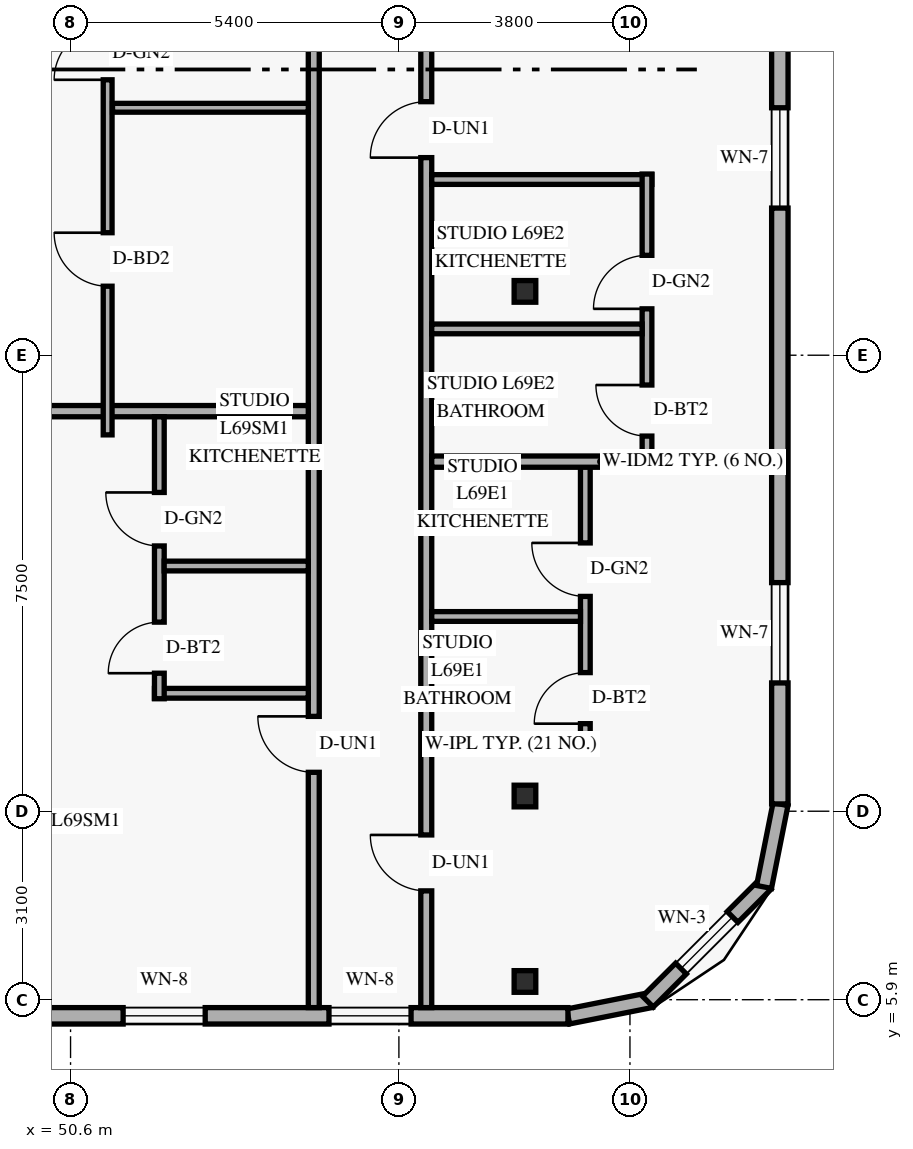
"""IFC4 building model, lengths in metres.
Left out: names, types, materials, properties, quantities, classifications, styles, units other than length and angle.
Written with IfcOpenShell. Run it as: python <this file> out.ifc"""

import sys

from ifc_helpers import new_model, si_unit, direction, frame, frame_2d, origin, origin_2d, place, context, subcontext, project, spatial, rectangle, hollow_rectangle, extrude, element, fill, save


model = new_model("IFC4")
c1 = context("Model", 3, precision=1e-05, world=origin(), true_north=direction((0.0, 1.0)))
c2 = subcontext(c1, "Body", "Model", "MODEL_VIEW")
j1 = project(units=[si_unit("LENGTHUNIT", "METRE"), si_unit("PLANEANGLEUNIT", "RADIAN")], contexts=[c1])
p1 = place(None, origin())
s1 = spatial("IfcSite", under=j1, at=p1, CompositionType="ELEMENT")
p2 = place(p1, origin())
s2 = spatial("IfcBuilding", under=s1, at=p2, CompositionType="ELEMENT")
p3 = place(p2, frame((0.0, 0.0, 264.0)))
s3 = spatial("IfcBuildingStorey", under=s2, at=p3, CompositionType="ELEMENT", Elevation=264.0)
for number, where, z_axis, x_axis in (
    (1, (57.969, 6.2, 0.0), (0.058, 0.0, 0.998), (0.0, 1.0, 0.0)),
    (2, (57.969, 9.25, 0.0), (0.058, 0.0, 0.998), (0.0, 1.0, 0.0)),
    (3, (57.969, 17.55, 0.0), (0.058, 0.0, 0.998), (0.0, 1.0, 0.0)),
):
    element("IfcColumn", number, at=place(p3, frame(where, z_axis=z_axis, x_axis=x_axis)), inside=s3, PredefinedType="COLUMN", context=c2, shape_type="SweptSolid", body=[
        extrude(hollow_rectangle(XDim=0.356, YDim=0.356, WallThickness=0.016, at=origin_2d()), origin(), (0.0, 0.0, 1.0), 3.606),
    ])
p4 = place(p3, frame((58.783, 5.624, 0.0), z_axis=(0.0, 0.0, 1.0), x_axis=(0.980809899341, 0.19496651342, 0.0)))
e4 = element("IfcWall", 4, at=p4, inside=s3, PredefinedType="SOLIDWALL", context=c2, shape_type="SweptSolid", body=[
    extrude(rectangle(XDim=1.389, YDim=0.25, at=frame_2d((0.694, 0.0))), origin(), (0.0, 0.0, 1.0), 3.36),
])
p5 = place(p3, frame((60.095, 5.868, 0.0), z_axis=(0.0, 0.0, 1.0), x_axis=(0.707106781187, 0.707106781187, 0.0)))
e5 = element("IfcWall", 5, at=p5, inside=s3, PredefinedType="SOLIDWALL", context=c2, shape_type="SweptSolid", body=[
    extrude(rectangle(XDim=2.739, YDim=0.25, at=frame_2d((1.37, 0.0))), origin(), (0.0, 0.0, 1.0), 3.36),
])
p6 = place(p5, frame((0.77, 0.0, 0.85)))
e6 = element("IfcOpeningElement", 6, at=p6, cuts=e5, PredefinedType="OPENING", context=c2, shape_type="SweptSolid", body=[
    extrude(rectangle(XDim=1.2, YDim=1.5, at=frame_2d((0.6, 0.75))), frame((0.0, 0.135, 0.0), z_axis=(0.0, -1.0, 0.0), x_axis=(1.0, 0.0, 0.0)), (0.0, 0.0, 1.0), 0.27),
])
p7 = place(p3, frame((62.005, 7.754, 0.0), z_axis=(0.0, 0.0, 1.0), x_axis=(0.195135625965, 0.9807762678, 0.0)))
e7 = element("IfcWall", 7, at=p7, inside=s3, PredefinedType="SOLIDWALL", context=c2, shape_type="SweptSolid", body=[
    extrude(rectangle(XDim=1.389, YDim=0.25, at=frame_2d((0.694, 0.0))), origin(), (0.0, 0.0, 1.0), 3.36),
])
p8 = place(p3, frame((25.82, 5.635, 0.0), z_axis=(0.0, 0.0, 1.0), x_axis=(1.0, 0.0, 0.0)))
e8 = element("IfcWall", 8, at=p8, inside=s3, PredefinedType="SOLIDWALL", context=c2, shape_type="SweptSolid", body=[
    extrude(rectangle(XDim=32.96, YDim=0.27, at=frame_2d((16.48, 0.0))), origin(), (0.0, 0.0, 1.0), 3.36),
])
p9 = place(p8, frame((14.363, 0.0, 0.85)))
e9 = element("IfcOpeningElement", 9, at=p9, cuts=e8, PredefinedType="OPENING", context=c2, shape_type="SweptSolid", body=[
    extrude(rectangle(XDim=1.35, YDim=1.55, at=frame_2d((0.675, 0.775))), frame((0.0, 0.145, 0.0), z_axis=(0.0, -1.0, 0.0), x_axis=(1.0, 0.0, 0.0)), (0.0, 0.0, 1.0), 0.29),
])
p10 = place(p8, frame((25.645, 0.0, 0.85)))
e10 = element("IfcOpeningElement", 10, at=p10, cuts=e8, PredefinedType="OPENING", context=c2, shape_type="SweptSolid", body=[
    extrude(rectangle(XDim=1.35, YDim=1.55, at=frame_2d((0.675, 0.775))), frame((0.0, 0.145, 0.0), z_axis=(0.0, -1.0, 0.0), x_axis=(1.0, 0.0, 0.0)), (0.0, 0.0, 1.0), 0.29),
])
p11 = place(p8, frame((29.03, 0.0, 0.85)))
e11 = element("IfcOpeningElement", 11, at=p11, cuts=e8, PredefinedType="OPENING", context=c2, shape_type="SweptSolid", body=[
    extrude(rectangle(XDim=1.35, YDim=1.55, at=frame_2d((0.675, 0.775))), frame((0.0, 0.145, 0.0), z_axis=(0.0, -1.0, 0.0), x_axis=(1.0, 0.0, 0.0)), (0.0, 0.0, 1.0), 0.29),
])
p12 = place(p3, frame((62.265, 9.12, 0.0), z_axis=(0.0, 0.0, 1.0), x_axis=(0.0, 1.0, 0.0)))
e12 = element("IfcWall", 12, at=p12, inside=s3, PredefinedType="SOLIDWALL", context=c2, shape_type="SweptSolid", body=[
    extrude(rectangle(XDim=29.76, YDim=0.27, at=frame_2d((14.88, 0.0))), origin(), (0.0, 0.0, 1.0), 3.36),
])
p13 = place(p12, frame((1.99, 0.0, 0.85)))
e13 = element("IfcOpeningElement", 13, at=p13, cuts=e12, PredefinedType="OPENING", context=c2, shape_type="SweptSolid", body=[
    extrude(rectangle(XDim=1.65, YDim=1.6, at=frame_2d((0.825, 0.8))), frame((0.0, 0.145, 0.0), z_axis=(0.0, -1.0, 0.0), x_axis=(1.0, 0.0, 0.0)), (0.0, 0.0, 1.0), 0.29),
])
p14 = place(p12, frame((9.8, 0.0, 0.85)))
e14 = element("IfcOpeningElement", 14, at=p14, cuts=e12, PredefinedType="OPENING", context=c2, shape_type="SweptSolid", body=[
    extrude(rectangle(XDim=1.65, YDim=1.6, at=frame_2d((0.825, 0.8))), frame((0.0, 0.145, 0.0), z_axis=(0.0, -1.0, 0.0), x_axis=(1.0, 0.0, 0.0)), (0.0, 0.0, 1.0), 0.29),
])
p15 = place(p12, frame((19.42, 0.0, 0.85)))
e15 = element("IfcOpeningElement", 15, at=p15, cuts=e12, PredefinedType="OPENING", context=c2, shape_type="SweptSolid", body=[
    extrude(rectangle(XDim=1.65, YDim=1.6, at=frame_2d((0.825, 0.8))), frame((0.0, 0.145, 0.0), z_axis=(0.0, -1.0, 0.0), x_axis=(1.0, 0.0, 0.0)), (0.0, 0.0, 1.0), 0.29),
])
p16 = place(p12, frame((26.49, 0.0, 0.85)))
e16 = element("IfcOpeningElement", 16, at=p16, cuts=e12, PredefinedType="OPENING", context=c2, shape_type="SweptSolid", body=[
    extrude(rectangle(XDim=1.65, YDim=1.6, at=frame_2d((0.825, 0.8))), frame((0.0, 0.145, 0.0), z_axis=(0.0, -1.0, 0.0), x_axis=(1.0, 0.0, 0.0)), (0.0, 0.0, 1.0), 0.29),
])
p17 = place(p3, frame((54.6, 5.77, 0.0), z_axis=(0.0, 0.0, 1.0), x_axis=(0.0, 1.0, 0.0)))
e17 = element("IfcWall", 17, at=p17, inside=s3, PredefinedType="STANDARD", context=c2, shape_type="SweptSolid", body=[
    extrude(rectangle(XDim=19.23, YDim=0.18, at=frame_2d((9.615, 0.0))), origin(), (0.0, 0.0, 1.0), 2.803),
])
p18 = place(p17, frame((3.87, 0.0, 0.0)))
e18 = element("IfcOpeningElement", 18, at=p18, cuts=e17, PredefinedType="OPENING", context=c2, shape_type="SweptSolid", body=[
    extrude(rectangle(XDim=0.92, YDim=2.15, at=frame_2d((0.46, 1.075))), frame((0.0, 0.1, 0.0), z_axis=(0.0, -1.0, 0.0), x_axis=(1.0, 0.0, 0.0)), (0.0, 0.0, 1.0), 0.2),
])
p19 = place(p3, frame((56.45, 5.77, 0.0), z_axis=(0.0, 0.0, 1.0), x_axis=(0.0, 1.0, 0.0)))
e19 = element("IfcWall", 19, at=p19, inside=s3, PredefinedType="STANDARD", context=c2, shape_type="SweptSolid", body=[
    extrude(rectangle(XDim=36.46, YDim=0.18, at=frame_2d((18.23, 0.0))), origin(), (0.0, 0.0, 1.0), 2.803),
])
p20 = place(p19, frame((1.92, 0.0, 0.0)))
e20 = element("IfcOpeningElement", 20, at=p20, cuts=e19, PredefinedType="OPENING", context=c2, shape_type="SweptSolid", body=[
    extrude(rectangle(XDim=0.92, YDim=2.15, at=frame_2d((0.46, 1.075))), frame((0.0, 0.1, 0.0), z_axis=(0.0, -1.0, 0.0), x_axis=(1.0, 0.0, 0.0)), (0.0, 0.0, 1.0), 0.2),
])
p21 = place(p19, frame((13.98, 0.0, 0.0)))
e21 = element("IfcOpeningElement", 21, at=p21, cuts=e19, PredefinedType="OPENING", context=c2, shape_type="SweptSolid", body=[
    extrude(rectangle(XDim=0.92, YDim=2.15, at=frame_2d((0.46, 1.075))), frame((0.0, 0.1, 0.0), z_axis=(0.0, -1.0, 0.0), x_axis=(1.0, 0.0, 0.0)), (0.0, 0.0, 1.0), 0.2),
])
p22 = place(p19, frame((24.99, 0.0, 0.0)))
e22 = element("IfcOpeningElement", 22, at=p22, cuts=e19, PredefinedType="OPENING", context=c2, shape_type="SweptSolid", body=[
    extrude(rectangle(XDim=0.92, YDim=2.15, at=frame_2d((0.46, 1.075))), frame((0.0, 0.1, 0.0), z_axis=(0.0, -1.0, 0.0), x_axis=(1.0, 0.0, 0.0)), (0.0, 0.0, 1.0), 0.2),
])
p23 = place(p19, frame((33.64, 0.0, 0.0)))
e23 = element("IfcOpeningElement", 23, at=p23, cuts=e19, PredefinedType="OPENING", context=c2, shape_type="SweptSolid", body=[
    extrude(rectangle(XDim=0.92, YDim=2.15, at=frame_2d((0.46, 1.075))), frame((0.0, 0.1, 0.0), z_axis=(0.0, -1.0, 0.0), x_axis=(1.0, 0.0, 0.0)), (0.0, 0.0, 1.0), 0.2),
])
p24 = place(p3, frame((56.54, 10.11, 0.0), z_axis=(0.0, 0.0, 1.0), x_axis=(1.0, 0.0, 0.0)))
e24 = element("IfcWall", 24, at=p24, inside=s3, PredefinedType="PLUMBINGWALL", context=c2, shape_type="SweptSolid", body=[
    extrude(rectangle(XDim=2.606, YDim=0.16, at=frame_2d((1.303, 0.0))), origin(), (0.0, 0.0, 1.0), 2.879),
])
p25 = place(p3, frame((59.066, 10.02, 0.0), z_axis=(0.0, 0.0, 1.0), x_axis=(0.0, 1.0, 0.0)))
e25 = element("IfcWall", 25, at=p25, inside=s3, PredefinedType="PLUMBINGWALL", context=c2, shape_type="SweptSolid", body=[
    extrude(rectangle(XDim=4.73, YDim=0.16, at=frame_2d((2.365, 0.0))), origin(), (0.0, 0.0, 1.0), 3.36),
])
p26 = place(p25, frame((0.42, 0.0, 0.0)))
e26 = element("IfcOpeningElement", 26, at=p26, cuts=e25, PredefinedType="OPENING", context=c2, shape_type="SweptSolid", body=[
    extrude(rectangle(XDim=0.84, YDim=2.12, at=frame_2d((0.42, 1.06))), frame((0.0, 0.09, 0.0), z_axis=(0.0, -1.0, 0.0), x_axis=(1.0, 0.0, 0.0)), (0.0, 0.0, 1.0), 0.18),
])
p27 = place(p25, frame((2.513, 0.0, 0.0)))
e27 = element("IfcOpeningElement", 27, at=p27, cuts=e25, PredefinedType="OPENING", context=c2, shape_type="SweptSolid", body=[
    extrude(rectangle(XDim=0.88, YDim=2.12, at=frame_2d((0.44, 1.06))), frame((0.0, 0.09, 0.0), z_axis=(0.0, -1.0, 0.0), x_axis=(1.0, 0.0, 0.0)), (0.0, 0.0, 1.0), 0.18),
])
p28 = place(p3, frame((56.54, 12.203, 0.0), z_axis=(0.0, 0.0, 1.0), x_axis=(1.0, 0.0, 0.0)))
e28 = element("IfcWall", 28, at=p28, inside=s3, PredefinedType="PLUMBINGWALL", context=c2, shape_type="SweptSolid", body=[
    extrude(rectangle(XDim=2.446, YDim=0.16, at=frame_2d((1.223, 0.0))), origin(), (0.0, 0.0, 1.0), 2.879),
])
p29 = place(p3, frame((56.54, 14.75, 0.0), z_axis=(0.0, 0.0, 1.0), x_axis=(1.0, 0.0, 0.0)))
e29 = element("IfcWall", 29, at=p29, inside=s3, PredefinedType="PARTITIONING", context=c2, shape_type="SweptSolid", body=[
    extrude(rectangle(XDim=5.59, YDim=0.185, at=frame_2d((2.795, 0.0))), origin(), (0.0, 0.0, 1.0), 2.879),
])
p30 = place(p3, frame((56.54, 19.39, 0.0), z_axis=(0.0, 0.0, 1.0), x_axis=(1.0, 0.0, 0.0)))
e30 = element("IfcWall", 30, at=p30, inside=s3, PredefinedType="PLUMBINGWALL", context=c2, shape_type="SweptSolid", body=[
    extrude(rectangle(XDim=3.62, YDim=0.16, at=frame_2d((1.81, 0.0))), origin(), (0.0, 0.0, 1.0), 2.879),
])
p31 = place(p3, frame((60.08, 14.843, 0.0), z_axis=(0.0, 0.0, 1.0), x_axis=(0.0, 1.0, 0.0)))
e31 = element("IfcWall", 31, at=p31, inside=s3, PredefinedType="PLUMBINGWALL", context=c2, shape_type="SweptSolid", body=[
    extrude(rectangle(XDim=4.637, YDim=0.16, at=frame_2d((2.319, 0.0))), origin(), (0.0, 0.0, 1.0), 3.36),
])
p32 = place(p31, frame((0.327, 0.0, 0.0)))
e32 = element("IfcOpeningElement", 32, at=p32, cuts=e31, PredefinedType="OPENING", context=c2, shape_type="SweptSolid", body=[
    extrude(rectangle(XDim=0.84, YDim=2.12, at=frame_2d((0.42, 1.06))), frame((0.0, 0.09, 0.0), z_axis=(0.0, -1.0, 0.0), x_axis=(1.0, 0.0, 0.0)), (0.0, 0.0, 1.0), 0.18),
])
p33 = place(p31, frame((2.42, 0.0, 0.0)))
e33 = element("IfcOpeningElement", 33, at=p33, cuts=e31, PredefinedType="OPENING", context=c2, shape_type="SweptSolid", body=[
    extrude(rectangle(XDim=0.88, YDim=2.12, at=frame_2d((0.44, 1.06))), frame((0.0, 0.09, 0.0), z_axis=(0.0, -1.0, 0.0), x_axis=(1.0, 0.0, 0.0)), (0.0, 0.0, 1.0), 0.18),
])
p34 = place(p3, frame((56.54, 16.933, 0.0), z_axis=(0.0, 0.0, 1.0), x_axis=(1.0, 0.0, 0.0)))
e34 = element("IfcWall", 34, at=p34, inside=s3, PredefinedType="PLUMBINGWALL", context=c2, shape_type="SweptSolid", body=[
    extrude(rectangle(XDim=3.46, YDim=0.16, at=frame_2d((1.73, 0.0))), origin(), (0.0, 0.0, 1.0), 2.879),
])
p35 = place(p3, frame((37.64, 15.58, 0.0), z_axis=(0.0, 0.0, 1.0), x_axis=(1.0, 0.0, 0.0)))
e35 = element("IfcWall", 35, at=p35, inside=s3, PredefinedType="PARTITIONING", context=c2, shape_type="SweptSolid", body=[
    extrude(rectangle(XDim=16.87, YDim=0.185, at=frame_2d((8.435, 0.0))), origin(), (0.0, 0.0, 1.0), 2.803),
])
p36 = place(p3, frame((51.98, 10.94, 0.0), z_axis=(0.0, 0.0, 1.0), x_axis=(1.0, 0.0, 0.0)))
e36 = element("IfcWall", 36, at=p36, inside=s3, PredefinedType="PLUMBINGWALL", context=c2, shape_type="SweptSolid", body=[
    extrude(rectangle(XDim=2.53, YDim=0.16, at=frame_2d((1.265, 0.0))), origin(), (0.0, 0.0, 1.0), 3.36),
])
p37 = place(p3, frame((52.06, 10.85, 0.0), z_axis=(0.0, 0.0, 1.0), x_axis=(0.0, 1.0, 0.0)))
e37 = element("IfcWall", 37, at=p37, inside=s3, PredefinedType="PLUMBINGWALL", context=c2, shape_type="SweptSolid", body=[
    extrude(rectangle(XDim=4.637, YDim=0.16, at=frame_2d((2.319, 0.0))), origin(), (0.0, 0.0, 1.0), 3.039),
])
p38 = place(p37, frame((0.42, 0.0, 0.0)))
e38 = element("IfcOpeningElement", 38, at=p38, cuts=e37, PredefinedType="OPENING", context=c2, shape_type="SweptSolid", body=[
    extrude(rectangle(XDim=0.84, YDim=2.12, at=frame_2d((0.42, 1.06))), frame((0.0, 0.09, 0.0), z_axis=(0.0, -1.0, 0.0), x_axis=(1.0, 0.0, 0.0)), (0.0, 0.0, 1.0), 0.18),
])
p39 = place(p37, frame((2.513, 0.0, 0.0)))
e39 = element("IfcOpeningElement", 39, at=p39, cuts=e37, PredefinedType="OPENING", context=c2, shape_type="SweptSolid", body=[
    extrude(rectangle(XDim=0.88, YDim=2.12, at=frame_2d((0.44, 1.06))), frame((0.0, 0.09, 0.0), z_axis=(0.0, -1.0, 0.0), x_axis=(1.0, 0.0, 0.0)), (0.0, 0.0, 1.0), 0.18),
])
p40 = place(p3, frame((52.14, 13.033, 0.0), z_axis=(0.0, 0.0, 1.0), x_axis=(1.0, 0.0, 0.0)))
e40 = element("IfcWall", 40, at=p40, inside=s3, PredefinedType="PLUMBINGWALL", context=c2, shape_type="SweptSolid", body=[
    extrude(rectangle(XDim=2.37, YDim=0.16, at=frame_2d((1.185, 0.0))), origin(), (0.0, 0.0, 1.0), 3.36),
])
p41 = place(p3, frame((51.21, 15.19, 0.0), z_axis=(0.0, 0.0, 1.0), x_axis=(0.0, 1.0, 0.0)))
e41 = element("IfcWall", 41, at=p41, inside=s3, PredefinedType="PARTITIONING", context=c2, shape_type="SweptSolid", body=[
    extrude(rectangle(XDim=9.72, YDim=0.145, at=frame_2d((4.86, 0.0))), origin(), (0.0, 0.0, 1.0), 2.803),
])
p42 = place(p41, frame((2.445, 0.0, 0.0)))
e42 = element("IfcOpeningElement", 42, at=p42, cuts=e41, PredefinedType="OPENING", context=c2, shape_type="SweptSolid", body=[
    extrude(rectangle(XDim=0.88, YDim=2.14, at=frame_2d((0.44, 1.07))), frame((0.0, 0.083, 0.0), z_axis=(0.0, -1.0, 0.0), x_axis=(1.0, 0.0, 0.0)), (0.0, 0.0, 1.0), 0.165),
])
p43 = place(p41, frame((5.84, 0.0, 0.0)))
e43 = element("IfcOpeningElement", 43, at=p43, cuts=e41, PredefinedType="OPENING", context=c2, shape_type="SweptSolid", body=[
    extrude(rectangle(XDim=0.88, YDim=2.12, at=frame_2d((0.44, 1.06))), frame((0.0, 0.083, 0.0), z_axis=(0.0, -1.0, 0.0), x_axis=(1.0, 0.0, 0.0)), (0.0, 0.0, 1.0), 0.165),
])
p44 = place(p3, frame((51.29, 20.57, 0.0), z_axis=(0.0, 0.0, 1.0), x_axis=(1.0, 0.0, 0.0)))
e44 = element("IfcWall", 44, at=p44, inside=s3, PredefinedType="PARTITIONING", context=c2, shape_type="SweptSolid", body=[
    extrude(rectangle(XDim=3.22, YDim=0.145, at=frame_2d((1.61, 0.0))), origin(), (0.0, 0.0, 1.0), 3.36),
])
p45 = place(p6, origin())
e45 = element("IfcWindow", 45, at=p45, inside=s3, PartitioningType="SINGLE_PANEL", PredefinedType="WINDOW", context=c2, shape_type="SweptSolid", body=[
    extrude(rectangle(XDim=1.2, YDim=1.5, at=frame_2d((0.6, 0.75))), frame((0.0, 0.03, 0.0), z_axis=(0.0, -1.0, 0.0), x_axis=(1.0, 0.0, 0.0)), (0.0, 0.0, 1.0), 0.06),
])
fill(e6, e45)
p46 = place(p10, origin())
e46 = element("IfcWindow", 46, at=p46, inside=s3, PartitioningType="SINGLE_PANEL", PredefinedType="WINDOW", context=c2, shape_type="SweptSolid", body=[
    extrude(rectangle(XDim=1.35, YDim=1.55, at=frame_2d((0.675, 0.775))), frame((0.0, 0.03, 0.0), z_axis=(0.0, -1.0, 0.0), x_axis=(1.0, 0.0, 0.0)), (0.0, 0.0, 1.0), 0.06),
])
fill(e10, e46)
p47 = place(p11, origin())
e47 = element("IfcWindow", 47, at=p47, inside=s3, PartitioningType="SINGLE_PANEL", PredefinedType="WINDOW", context=c2, shape_type="SweptSolid", body=[
    extrude(rectangle(XDim=1.35, YDim=1.55, at=frame_2d((0.675, 0.775))), frame((0.0, 0.03, 0.0), z_axis=(0.0, -1.0, 0.0), x_axis=(1.0, 0.0, 0.0)), (0.0, 0.0, 1.0), 0.06),
])
fill(e11, e47)
p48 = place(p13, origin())
e48 = element("IfcWindow", 48, at=p48, inside=s3, PartitioningType="SINGLE_PANEL", PredefinedType="WINDOW", context=c2, shape_type="SweptSolid", body=[
    extrude(rectangle(XDim=1.65, YDim=1.6, at=frame_2d((0.825, 0.8))), frame((0.0, 0.03, 0.0), z_axis=(0.0, -1.0, 0.0), x_axis=(1.0, 0.0, 0.0)), (0.0, 0.0, 1.0), 0.06),
])
fill(e13, e48)
p49 = place(p14, origin())
e49 = element("IfcWindow", 49, at=p49, inside=s3, PartitioningType="SINGLE_PANEL", PredefinedType="WINDOW", context=c2, shape_type="SweptSolid", body=[
    extrude(rectangle(XDim=1.65, YDim=1.6, at=frame_2d((0.825, 0.8))), frame((0.0, 0.03, 0.0), z_axis=(0.0, -1.0, 0.0), x_axis=(1.0, 0.0, 0.0)), (0.0, 0.0, 1.0), 0.06),
])
fill(e14, e49)
p50 = place(p20, origin())
e50 = element("IfcDoor", 50, at=p50, inside=s3, OperationType="SINGLE_SWING_RIGHT", PredefinedType="DOOR", context=c2, shape_type="SweptSolid", body=[
    extrude(rectangle(XDim=0.92, YDim=2.15, at=frame_2d((0.46, 1.075))), frame((0.0, 0.025, 0.0), z_axis=(0.0, -1.0, 0.0), x_axis=(1.0, 0.0, 0.0)), (0.0, 0.0, 1.0), 0.05),
])
fill(e20, e50)
p51 = place(p26, origin())
e51 = element("IfcDoor", 51, at=p51, inside=s3, OperationType="SINGLE_SWING_LEFT", PredefinedType="DOOR", context=c2, shape_type="SweptSolid", body=[
    extrude(rectangle(XDim=0.84, YDim=2.12, at=frame_2d((0.42, 1.06))), frame((0.0, 0.025, 0.0), z_axis=(0.0, -1.0, 0.0), x_axis=(1.0, 0.0, 0.0)), (0.0, 0.0, 1.0), 0.05),
])
fill(e26, e51)
p52 = place(p27, origin())
e52 = element("IfcDoor", 52, at=p52, inside=s3, OperationType="SINGLE_SWING_RIGHT", PredefinedType="DOOR", context=c2, shape_type="SweptSolid", body=[
    extrude(rectangle(XDim=0.88, YDim=2.12, at=frame_2d((0.44, 1.06))), frame((0.0, 0.025, 0.0), z_axis=(0.0, -1.0, 0.0), x_axis=(1.0, 0.0, 0.0)), (0.0, 0.0, 1.0), 0.05),
])
fill(e27, e52)
p53 = place(p21, origin())
e53 = element("IfcDoor", 53, at=p53, inside=s3, OperationType="SINGLE_SWING_LEFT", PredefinedType="DOOR", context=c2, shape_type="SweptSolid", body=[
    extrude(rectangle(XDim=0.92, YDim=2.15, at=frame_2d((0.46, 1.075))), frame((0.0, 0.025, 0.0), z_axis=(0.0, -1.0, 0.0), x_axis=(1.0, 0.0, 0.0)), (0.0, 0.0, 1.0), 0.05),
])
fill(e21, e53)
p54 = place(p32, origin())
e54 = element("IfcDoor", 54, at=p54, inside=s3, OperationType="SINGLE_SWING_RIGHT", PredefinedType="DOOR", context=c2, shape_type="SweptSolid", body=[
    extrude(rectangle(XDim=0.84, YDim=2.12, at=frame_2d((0.42, 1.06))), frame((0.0, 0.025, 0.0), z_axis=(0.0, -1.0, 0.0), x_axis=(1.0, 0.0, 0.0)), (0.0, 0.0, 1.0), 0.05),
])
fill(e32, e54)
p55 = place(p33, origin())
e55 = element("IfcDoor", 55, at=p55, inside=s3, OperationType="SINGLE_SWING_LEFT", PredefinedType="DOOR", context=c2, shape_type="SweptSolid", body=[
    extrude(rectangle(XDim=0.88, YDim=2.12, at=frame_2d((0.44, 1.06))), frame((0.0, 0.025, 0.0), z_axis=(0.0, -1.0, 0.0), x_axis=(1.0, 0.0, 0.0)), (0.0, 0.0, 1.0), 0.05),
])
fill(e33, e55)
p56 = place(p18, origin())
e56 = element("IfcDoor", 56, at=p56, inside=s3, OperationType="SINGLE_SWING_RIGHT", PredefinedType="DOOR", context=c2, shape_type="SweptSolid", body=[
    extrude(rectangle(XDim=0.92, YDim=2.15, at=frame_2d((0.46, 1.075))), frame((0.0, 0.025, 0.0), z_axis=(0.0, -1.0, 0.0), x_axis=(1.0, 0.0, 0.0)), (0.0, 0.0, 1.0), 0.05),
])
fill(e18, e56)
p57 = place(p38, origin())
e57 = element("IfcDoor", 57, at=p57, inside=s3, OperationType="SINGLE_SWING_LEFT", PredefinedType="DOOR", context=c2, shape_type="SweptSolid", body=[
    extrude(rectangle(XDim=0.84, YDim=2.12, at=frame_2d((0.42, 1.06))), frame((0.0, 0.025, 0.0), z_axis=(0.0, -1.0, 0.0), x_axis=(1.0, 0.0, 0.0)), (0.0, 0.0, 1.0), 0.05),
])
fill(e38, e57)
p58 = place(p39, origin())
e58 = element("IfcDoor", 58, at=p58, inside=s3, OperationType="SINGLE_SWING_RIGHT", PredefinedType="DOOR", context=c2, shape_type="SweptSolid", body=[
    extrude(rectangle(XDim=0.88, YDim=2.12, at=frame_2d((0.44, 1.06))), frame((0.0, 0.025, 0.0), z_axis=(0.0, -1.0, 0.0), x_axis=(1.0, 0.0, 0.0)), (0.0, 0.0, 1.0), 0.05),
])
fill(e39, e58)
p59 = place(p42, origin())
e59 = element("IfcDoor", 59, at=p59, inside=s3, OperationType="SINGLE_SWING_RIGHT", PredefinedType="DOOR", context=c2, shape_type="SweptSolid", body=[
    extrude(rectangle(XDim=0.88, YDim=2.14, at=frame_2d((0.44, 1.07))), frame((0.0, 0.025, 0.0), z_axis=(0.0, -1.0, 0.0), x_axis=(1.0, 0.0, 0.0)), (0.0, 0.0, 1.0), 0.05),
])
fill(e42, e59)
p60 = place(p43, origin())
e60 = element("IfcDoor", 60, at=p60, inside=s3, OperationType="SINGLE_SWING_LEFT", PredefinedType="DOOR", context=c2, shape_type="SweptSolid", body=[
    extrude(rectangle(XDim=0.88, YDim=2.12, at=frame_2d((0.44, 1.06))), frame((0.0, 0.025, 0.0), z_axis=(0.0, -1.0, 0.0), x_axis=(1.0, 0.0, 0.0)), (0.0, 0.0, 1.0), 0.05),
])
fill(e43, e60)
save(model, sys.argv[1])
